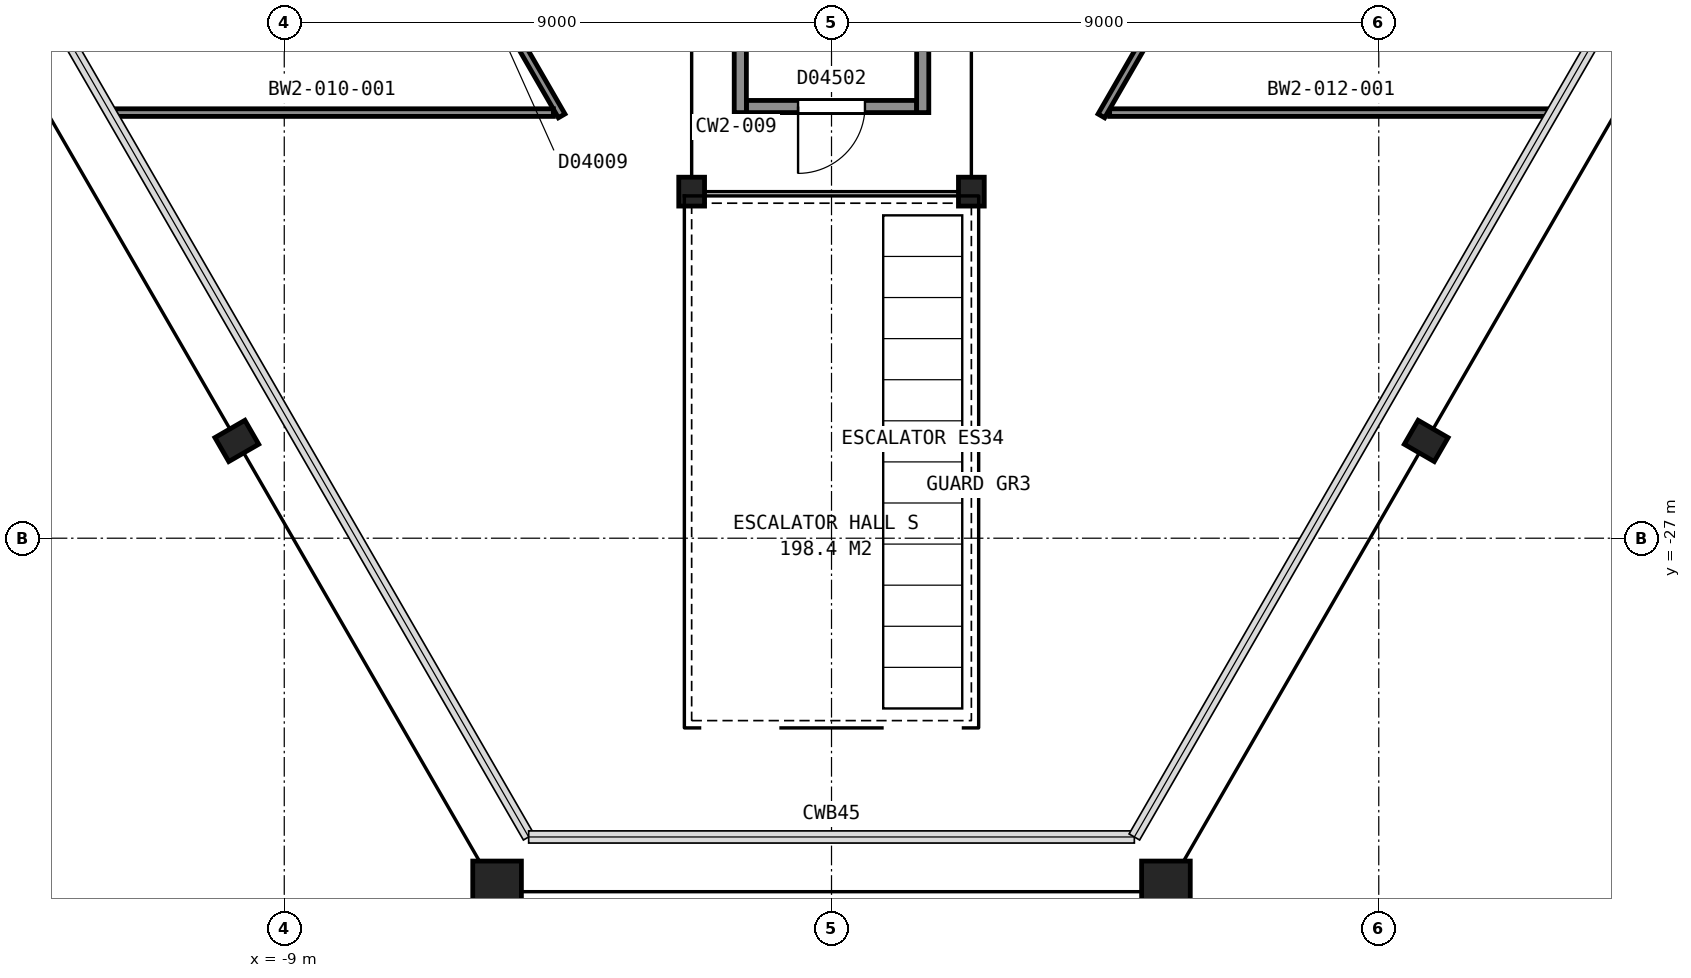
"""IFC4 building model, lengths in metres.
Left out: names, types, materials, properties, quantities, classifications, styles, units other than length and angle.
Written with IfcOpenShell. Run it as: python <this file> out.ifc"""

import sys

from ifc_helpers import new_model, si_unit, direction, frame, frame_2d, origin, origin_2d, place, context, subcontext, project, spatial, rectangle, hollow_rectangle, i_section, extrude, element, fill, save


model = new_model("IFC4")
c1 = context("Model", 3, precision=1e-05, world=origin(), true_north=direction((0.0, 1.0)))
c2 = subcontext(c1, "Body", "Model", "MODEL_VIEW")
j1 = project(units=[si_unit("LENGTHUNIT", "METRE"), si_unit("PLANEANGLEUNIT", "RADIAN")], contexts=[c1])
p1 = place(None, origin())
s1 = spatial("IfcSite", under=j1, at=p1, CompositionType="ELEMENT")
p2 = place(p1, origin())
s2 = spatial("IfcBuilding", under=s1, at=p2, CompositionType="ELEMENT")
p3 = place(p2, frame((0.0, 0.0, 27.2)))
s3 = spatial("IfcBuildingStorey", under=s2, at=p3, CompositionType="ELEMENT", Elevation=27.2)
p4 = place(p3, frame((-9.78, -25.4, 0.0), z_axis=(0.0, 0.0, 1.0), x_axis=(-0.5, 0.866025403784, 0.0)))
e1 = element("IfcColumn", 1, at=p4, inside=s3, PredefinedType="COLUMN", context=c2, shape_type="SweptSolid", body=[
    extrude(i_section(OverallWidth=0.455, OverallDepth=0.569, WebThickness=0.078, FlangeThickness=0.125, FilletRadius=0.015, at=origin_2d()), origin(), (0.0, 0.0, 1.0), 4.77),
])
for number, where, z_axis, x_axis in (
    (2, (-5.5, -32.81, 0.0), (0.0, 0.0, 1.0), (-1.0, 0.0, 0.0)),
    (3, (5.5, -32.81, 0.0), (0.0, 0.0, 1.0), (-1.0, 0.0, 0.0)),
):
    element("IfcColumn", number, at=place(p3, frame(where, z_axis=z_axis, x_axis=x_axis)), inside=s3, PredefinedType="COLUMN", context=c2, shape_type="SweptSolid", body=[
        extrude(hollow_rectangle(XDim=0.8, YDim=1.0, WallThickness=0.075, at=origin_2d()), origin(), (0.0, 0.0, 1.0), 4.755),
    ])
p5 = place(p3, frame((9.78, -25.4, 0.0), z_axis=(0.0, 0.0, 1.0), x_axis=(-0.5, -0.866025403784, 0.0)))
e4 = element("IfcColumn", 4, at=p5, inside=s3, PredefinedType="COLUMN", context=c2, shape_type="SweptSolid", body=[
    extrude(i_section(OverallWidth=0.455, OverallDepth=0.569, WebThickness=0.078, FlangeThickness=0.125, FilletRadius=0.015, at=origin_2d()), origin(), (0.0, 0.0, 1.0), 4.77),
])
for number, where, z_axis, x_axis in (
    (5, (-2.3, -21.3, 0.0), (0.0, 0.0, 1.0), (-1.0, 0.0, 0.0)),
    (6, (2.3, -21.3, 0.0), (0.0, 0.0, 1.0), (-1.0, 0.0, 0.0)),
):
    element("IfcColumn", number, at=place(p3, frame(where, z_axis=z_axis, x_axis=x_axis)), inside=s3, PredefinedType="COLUMN", context=c2, shape_type="SweptSolid", body=[
        extrude(i_section(OverallWidth=0.424, OverallDepth=0.475, WebThickness=0.048, FlangeThickness=0.077, FilletRadius=0.015, at=origin_2d()), origin(), (0.0, 0.0, 1.0), 4.8),
    ])
p6 = place(p3, frame((-1.4, -19.9, 0.0), z_axis=(0.0, 0.0, 1.0), x_axis=(1.0, 0.0, 0.0)))
e7 = element("IfcWall", 7, at=p6, inside=s3, PredefinedType="PARTITIONING", context=c2, shape_type="SweptSolid", body=[
    extrude(rectangle(XDim=2.8, YDim=0.2, at=frame_2d((1.4, 0.0))), origin(), (0.0, 0.0, 1.0), 4.55),
])
p7 = place(p6, frame((0.85, 0.0, 0.0)))
e8 = element("IfcOpeningElement", 8, at=p7, cuts=e7, PredefinedType="OPENING", context=c2, shape_type="SweptSolid", body=[
    extrude(rectangle(XDim=1.1, YDim=2.1, at=frame_2d((0.55, 1.05))), frame((0.0, 0.11, 0.0), z_axis=(0.0, -1.0, 0.0), x_axis=(1.0, 0.0, 0.0)), (0.0, 0.0, 1.0), 0.22),
])
for number, where, z_axis, x_axis in (
    (9, (1.5, -8.0, 0.0), (0.0, 0.0, 1.0), (0.0, -1.0, 0.0)),
    (10, (-1.5, -8.0, 0.0), (0.0, 0.0, 1.0), (0.0, -1.0, 0.0)),
):
    element("IfcWall", number, at=place(p3, frame(where, z_axis=z_axis, x_axis=x_axis)), inside=s3, PredefinedType="PARTITIONING", context=c2, shape_type="SweptSolid", body=[
        extrude(rectangle(XDim=12.0, YDim=0.2, at=frame_2d((6.0, 0.0))), origin(), (0.0, 0.0, 1.0), 4.55),
    ])
p8 = place(p3, frame((-4.438, -20.054, 0.0), z_axis=(0.0, 0.0, 1.0), x_axis=(-0.499994028088, 0.866028851642, 0.0)))
e11 = element("IfcWall", 11, at=p8, inside=s3, PredefinedType="PARTITIONING", context=c2, shape_type="SweptSolid", body=[
    extrude(rectangle(XDim=30.297, YDim=0.125, at=frame_2d((15.148, 0.0))), origin(), (0.0, 0.0, 1.0), 3.653),
])
p9 = place(p8, frame((23.885, 0.0, 0.0)))
e12 = element("IfcOpeningElement", 12, at=p9, cuts=e11, PredefinedType="OPENING", context=c2, shape_type="SweptSolid", body=[
    extrude(rectangle(XDim=1.8, YDim=2.4, at=frame_2d((0.9, 1.2))), frame((0.0, 0.073, 0.0), z_axis=(0.0, -1.0, 0.0), x_axis=(1.0, 0.0, 0.0)), (0.0, 0.0, 1.0), 0.145),
])
p10 = place(p8, frame((12.541, 0.0, 0.0)))
e13 = element("IfcOpeningElement", 13, at=p10, cuts=e11, PredefinedType="OPENING", context=c2, shape_type="SweptSolid", body=[
    extrude(rectangle(XDim=1.0, YDim=2.1, at=frame_2d((0.5, 1.05))), frame((0.0, 0.073, 0.0), z_axis=(0.0, -1.0, 0.0), x_axis=(1.0, 0.0, 0.0)), (0.0, 0.0, 1.0), 0.145),
])
p11 = place(p8, frame((2.916, 0.0, 0.0)))
e14 = element("IfcOpeningElement", 14, at=p11, cuts=e11, PredefinedType="OPENING", context=c2, shape_type="SweptSolid", body=[
    extrude(rectangle(XDim=1.0, YDim=2.1, at=frame_2d((0.5, 1.05))), frame((0.0, 0.073, 0.0), z_axis=(0.0, -1.0, 0.0), x_axis=(1.0, 0.0, 0.0)), (0.0, 0.0, 1.0), 0.145),
])
for number, where, z_axis, x_axis in (
    (15, (-11.859, -20.0, 0.0), (0.0, 0.0, 1.0), (1.0, 0.0, 0.0)),
    (16, (4.574, -20.0, 0.0), (0.0, 0.0, 1.0), (1.0, 0.0, 0.0)),
):
    element("IfcWall", number, at=place(p3, frame(where, z_axis=z_axis, x_axis=x_axis)), inside=s3, PredefinedType="PARTITIONING", context=c2, shape_type="SweptSolid", body=[
        extrude(rectangle(XDim=7.285, YDim=0.125, at=frame_2d((3.643, 0.0))), origin(), (0.0, 0.0, 1.0), 4.64),
    ])
p12 = place(p3, frame((19.586, 6.184, 0.0), z_axis=(0.0, 0.0, 1.0), x_axis=(-0.499994028088, -0.866028851642, 0.0)))
e17 = element("IfcWall", 17, at=p12, inside=s3, PredefinedType="PARTITIONING", context=c2, shape_type="SweptSolid", body=[
    extrude(rectangle(XDim=30.297, YDim=0.125, at=frame_2d((15.148, 0.0))), origin(), (0.0, 0.0, 1.0), 3.653),
])
p13 = place(p12, frame((25.985, 0.0, 0.0)))
e18 = element("IfcOpeningElement", 18, at=p13, cuts=e17, PredefinedType="OPENING", context=c2, shape_type="SweptSolid", body=[
    extrude(rectangle(XDim=1.8, YDim=2.4, at=frame_2d((0.9, 1.2))), frame((0.0, 0.073, 0.0), z_axis=(0.0, -1.0, 0.0), x_axis=(1.0, 0.0, 0.0)), (0.0, 0.0, 1.0), 0.145),
])
p14 = place(p12, frame((18.832, 0.0, 0.0)))
e19 = element("IfcOpeningElement", 19, at=p14, cuts=e17, PredefinedType="OPENING", context=c2, shape_type="SweptSolid", body=[
    extrude(rectangle(XDim=1.0, YDim=2.1, at=frame_2d((0.5, 1.05))), frame((0.0, 0.073, 0.0), z_axis=(0.0, -1.0, 0.0), x_axis=(1.0, 0.0, 0.0)), (0.0, 0.0, 1.0), 0.145),
])
p15 = place(p12, frame((10.049, 0.0, 0.0)))
e20 = element("IfcOpeningElement", 20, at=p15, cuts=e17, PredefinedType="OPENING", context=c2, shape_type="SweptSolid", body=[
    extrude(rectangle(XDim=1.8, YDim=2.4, at=frame_2d((0.9, 1.2))), frame((0.0, 0.073, 0.0), z_axis=(0.0, -1.0, 0.0), x_axis=(1.0, 0.0, 0.0)), (0.0, 0.0, 1.0), 0.145),
])
p16 = place(p12, frame((2.917, 0.0, 0.0)))
e21 = element("IfcOpeningElement", 21, at=p16, cuts=e17, PredefinedType="OPENING", context=c2, shape_type="SweptSolid", body=[
    extrude(rectangle(XDim=1.0, YDim=2.1, at=frame_2d((0.5, 1.05))), frame((0.0, 0.073, 0.0), z_axis=(0.0, -1.0, 0.0), x_axis=(1.0, 0.0, 0.0)), (0.0, 0.0, 1.0), 0.145),
])
p17 = place(p7, origin())
e22 = element("IfcDoor", 22, at=p17, inside=s3, OperationType="SINGLE_SWING_LEFT", PredefinedType="DOOR", context=c2, shape_type="SweptSolid", body=[
    extrude(rectangle(XDim=1.1, YDim=2.1, at=frame_2d((0.55, 1.05))), frame((0.0, 0.025, 0.0), z_axis=(0.0, -1.0, 0.0), x_axis=(1.0, 0.0, 0.0)), (0.0, 0.0, 1.0), 0.05),
])
fill(e8, e22)
save(model, sys.argv[1])
